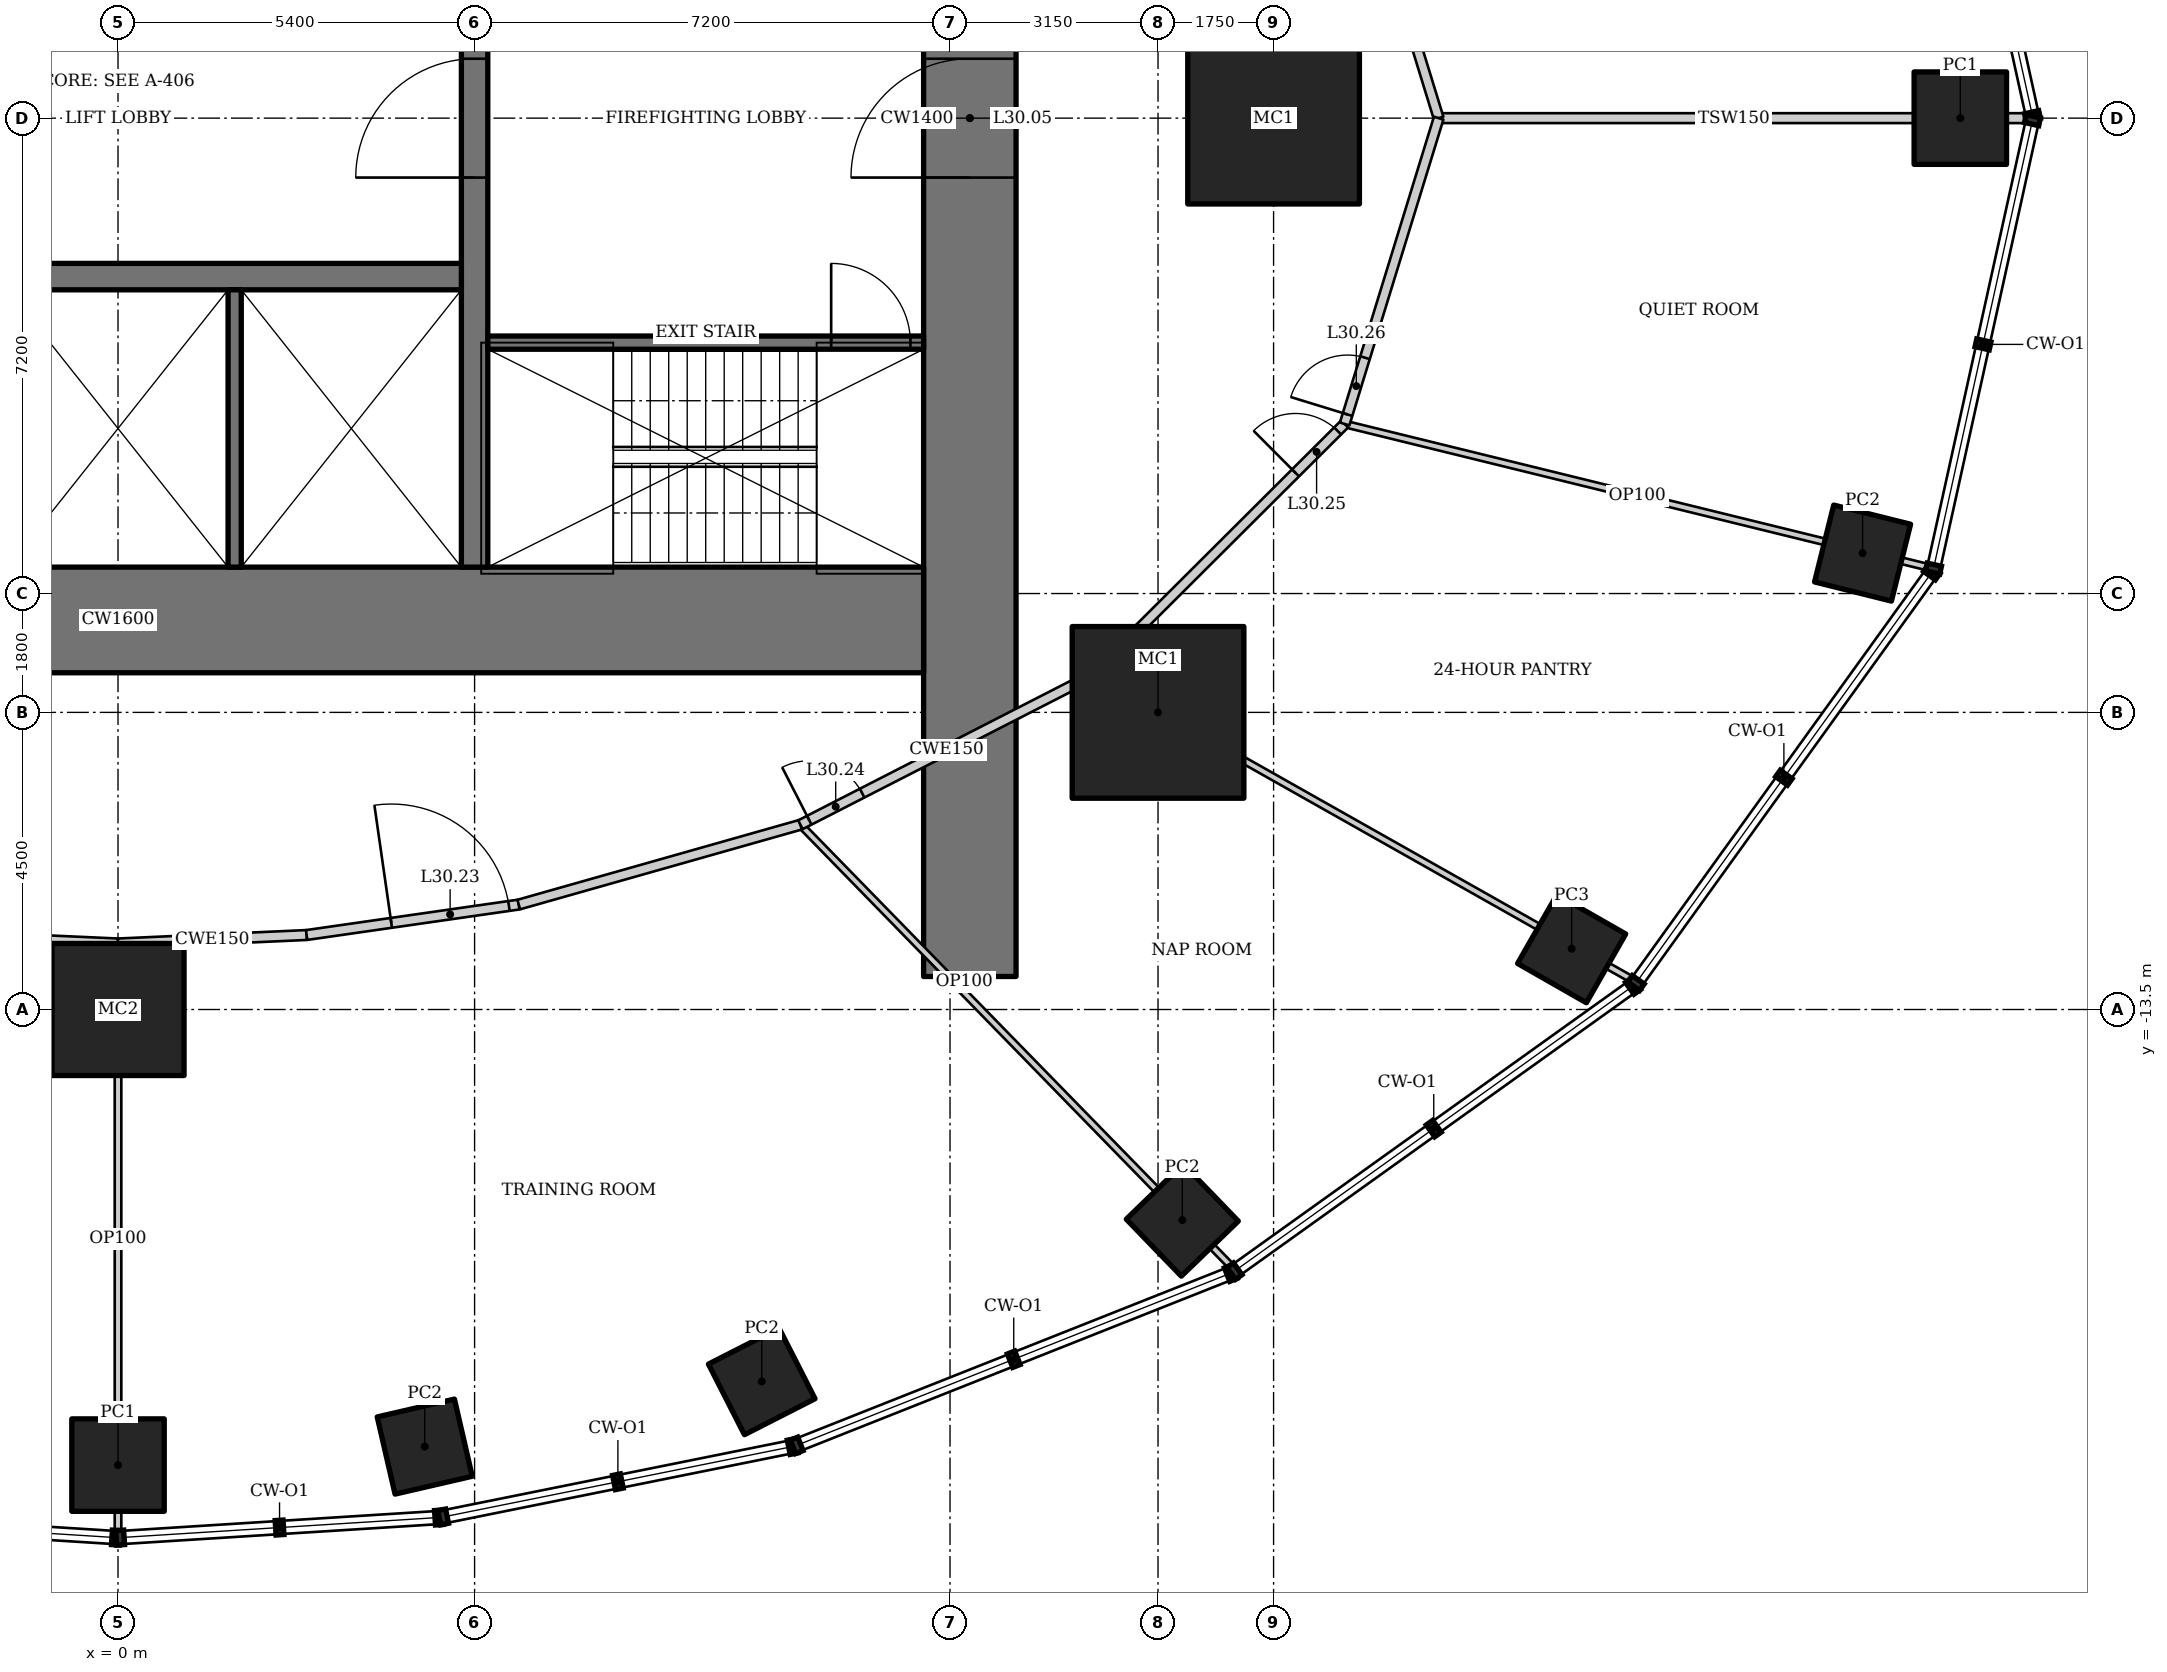
"""IFC4 building model, lengths in metres.
Left out: names, types, materials, properties, quantities, classifications, styles, units other than length and angle.
Written with IfcOpenShell. Run it as: python <this file> out.ifc"""

import sys

from ifc_helpers import new_model, si_unit, direction, frame, frame_2d, origin, origin_2d, place, context, subcontext, project, spatial, rectangle, hollow_rectangle, extrude, element, fill, save


model = new_model("IFC4")
c1 = context("Model", 3, precision=1e-05, world=origin(), true_north=direction((0.0, 1.0)))
c2 = subcontext(c1, "Body", "Model", "MODEL_VIEW")
j1 = project(units=[si_unit("LENGTHUNIT", "METRE"), si_unit("PLANEANGLEUNIT", "RADIAN")], contexts=[c1])
p1 = place(None, origin())
s1 = spatial("IfcSite", under=j1, at=p1, CompositionType="ELEMENT")
p2 = place(p1, origin())
s2 = spatial("IfcBuilding", under=s1, at=p2, CompositionType="ELEMENT")
p3 = place(p2, frame((0.0, 0.0, 130.0)))
s3 = spatial("IfcBuildingStorey", under=s2, at=p3, CompositionType="ELEMENT", Elevation=130.0)
p4 = place(p3, frame((17.5, 0.0, 0.0), z_axis=(0.0, 0.0, 1.0), x_axis=(1.0, 0.0, 0.0)))
e1 = element("IfcColumn", 1, at=p4, inside=s3, PredefinedType="COLUMN", context=c2, shape_type="SweptSolid", body=[
    extrude(hollow_rectangle(XDim=2.6, YDim=2.6, WallThickness=0.13, at=origin_2d()), origin(), (0.0, 0.0, 1.0), 4.2),
])
p5 = place(p3, frame((0.0, -13.5, 0.0), z_axis=(0.0, 0.0, 1.0), x_axis=(1.0, 0.0, 0.0)))
e2 = element("IfcColumn", 2, at=p5, inside=s3, PredefinedType="COLUMN", context=c2, shape_type="SweptSolid", body=[
    extrude(hollow_rectangle(XDim=2.0, YDim=2.0, WallThickness=0.17, at=origin_2d()), origin(), (0.0, 0.0, 1.0), 4.2),
])
p6 = place(p3, frame((15.75, -9.0, 0.0), z_axis=(0.0, 0.0, 1.0), x_axis=(1.0, 0.0, 0.0)))
e3 = element("IfcColumn", 3, at=p6, inside=s3, PredefinedType="COLUMN", context=c2, shape_type="SweptSolid", body=[
    extrude(hollow_rectangle(XDim=2.6, YDim=2.6, WallThickness=0.13, at=origin_2d()), origin(), (0.0, 0.0, 1.0), 4.2),
])
for number, where, z_axis, x_axis in (
    (4, (27.9, 0.0, 0.0), (0.0, 0.0, 1.0), (1.0, 0.0, 0.0)),
    (5, (0.0, -20.4, 0.0), (0.0, 0.0, 1.0), (1.0, 0.0, 0.0)),
):
    element("IfcColumn", number, at=place(p3, frame(where, z_axis=z_axis, x_axis=x_axis)), inside=s3, PredefinedType="COLUMN", context=c2, shape_type="SweptSolid", body=[
        extrude(hollow_rectangle(XDim=1.4, YDim=1.4, WallThickness=0.1, at=origin_2d()), origin(), (0.0, 0.0, 1.0), 4.2),
    ])
for number, where, z_axis, x_axis in (
    (6, (4.645, -20.12, 0.0), (0.0, 0.0, 1.0), (0.974, 0.225, 0.0)),
    (7, (9.749, -19.133, 0.0), (0.0, 0.0, 1.0), (0.891, 0.454, 0.0)),
    (8, (16.118, -16.69, 0.0), (0.0, 0.0, 1.0), (0.719, 0.695, 0.0)),
):
    element("IfcColumn", number, at=place(p3, frame(where, z_axis=z_axis, x_axis=x_axis)), inside=s3, PredefinedType="COLUMN", context=c2, shape_type="SweptSolid", body=[
        extrude(hollow_rectangle(XDim=1.2, YDim=1.2, WallThickness=0.1, at=origin_2d()), origin(), (0.0, 0.0, 1.0), 4.2),
    ])
p7 = place(p3, frame((22.014, -12.579, 0.0), z_axis=(0.0, 0.0, 1.0), x_axis=(0.496139221777, 0.86824298017, 0.0)))
e9 = element("IfcColumn", 9, at=p7, inside=s3, PredefinedType="COLUMN", context=c2, shape_type="SweptSolid", body=[
    extrude(hollow_rectangle(XDim=1.2, YDim=1.2, WallThickness=0.12, at=origin_2d()), origin(), (0.0, 0.0, 1.0), 4.2),
])
p8 = place(p3, frame((26.42, -6.587, 0.0), z_axis=(0.0, 0.0, 1.0), x_axis=(0.2419218956, 0.970295726276, 0.0)))
e10 = element("IfcColumn", 10, at=p8, inside=s3, PredefinedType="COLUMN", context=c2, shape_type="SweptSolid", body=[
    extrude(hollow_rectangle(XDim=1.2, YDim=1.2, WallThickness=0.1, at=origin_2d()), origin(), (0.0, 0.0, 1.0), 4.2),
])
p9 = place(p3, frame((12.9, -13.0, 0.0), z_axis=(0.0, 0.0, 1.0), x_axis=(0.0, 1.0, 0.0)))
e11 = element("IfcWall", 11, at=p9, inside=s3, PredefinedType="SHEAR", context=c2, shape_type="SweptSolid", body=[
    extrude(rectangle(XDim=26.0, YDim=1.4, at=frame_2d((13.0, 0.0))), origin(), (0.0, 0.0, 1.0), 4.2),
])
p10 = place(p9, frame((12.1, 0.0, 0.0)))
e12 = element("IfcOpeningElement", 12, at=p10, cuts=e11, PredefinedType="OPENING", context=c2, shape_type="SweptSolid", body=[
    extrude(rectangle(XDim=1.8, YDim=2.1, at=frame_2d((0.9, 1.05))), frame((0.0, 0.71, 0.0), z_axis=(0.0, -1.0, 0.0), x_axis=(1.0, 0.0, 0.0)), (0.0, 0.0, 1.0), 1.42),
])
p11 = place(p3, frame((-12.2, -7.6, 0.0), z_axis=(0.0, 0.0, 1.0), x_axis=(1.0, 0.0, 0.0)))
e13 = element("IfcWall", 13, at=p11, inside=s3, PredefinedType="SHEAR", context=c2, shape_type="SweptSolid", body=[
    extrude(rectangle(XDim=24.4, YDim=1.6, at=frame_2d((12.2, 0.0))), origin(), (0.0, 0.0, 1.0), 4.2),
])
p12 = place(p3, frame((5.4, -6.8, 0.0), z_axis=(0.0, 0.0, 1.0), x_axis=(0.0, 1.0, 0.0)))
e14 = element("IfcWall", 14, at=p12, inside=s3, PredefinedType="SHEAR", context=c2, shape_type="SweptSolid", body=[
    extrude(rectangle(XDim=13.6, YDim=0.4, at=frame_2d((6.8, 0.0))), origin(), (0.0, 0.0, 1.0), 4.2),
])
p13 = place(p12, frame((5.9, 0.0, 0.0)))
e15 = element("IfcOpeningElement", 15, at=p13, cuts=e14, PredefinedType="OPENING", context=c2, shape_type="SweptSolid", body=[
    extrude(rectangle(XDim=1.8, YDim=2.1, at=frame_2d((0.9, 1.05))), frame((0.0, 0.21, 0.0), z_axis=(0.0, -1.0, 0.0), x_axis=(1.0, 0.0, 0.0)), (0.0, 0.0, 1.0), 0.42),
])
p14 = place(p3, frame((-5.2, -2.4, 0.0), z_axis=(0.0, 0.0, 1.0), x_axis=(1.0, 0.0, 0.0)))
e16 = element("IfcWall", 16, at=p14, inside=s3, PredefinedType="SHEAR", context=c2, shape_type="SweptSolid", body=[
    extrude(rectangle(XDim=10.4, YDim=0.4, at=frame_2d((5.2, 0.0))), origin(), (0.0, 0.0, 1.0), 4.2),
])
p15 = place(p3, frame((1.767, -2.6, 0.0), z_axis=(0.0, 0.0, 1.0), x_axis=(0.0, -1.0, 0.0)))
e17 = element("IfcWall", 17, at=p15, inside=s3, PredefinedType="SOLIDWALL", context=c2, shape_type="SweptSolid", body=[
    extrude(rectangle(XDim=4.2, YDim=0.2, at=frame_2d((2.1, 0.0))), origin(), (0.0, 0.0, 1.0), 4.2),
])
p16 = place(p3, frame((5.6, -3.4, 0.0), z_axis=(0.0, 0.0, 1.0), x_axis=(1.0, 0.0, 0.0)))
e18 = element("IfcWall", 18, at=p16, inside=s3, PredefinedType="SHEAR", context=c2, shape_type="SweptSolid", body=[
    extrude(rectangle(XDim=6.6, YDim=0.2, at=frame_2d((3.3, 0.0))), origin(), (0.0, 0.0, 1.0), 4.2),
])
p17 = place(p16, frame((5.2, 0.0, 0.0)))
e19 = element("IfcOpeningElement", 19, at=p17, cuts=e18, PredefinedType="OPENING", context=c2, shape_type="SweptSolid", body=[
    extrude(rectangle(XDim=1.2, YDim=2.1, at=frame_2d((0.6, 1.05))), frame((0.0, 0.11, 0.0), z_axis=(0.0, -1.0, 0.0), x_axis=(1.0, 0.0, 0.0)), (0.0, 0.0, 1.0), 0.22),
])
p18 = place(p3, frame((28.944, 0.0, 0.0), z_axis=(0.0, 0.0, 1.0), x_axis=(-1.0, 0.0, 0.0)))
e20 = element("IfcWall", 20, at=p18, inside=s3, PredefinedType="PARTITIONING", context=c2, shape_type="SweptSolid", body=[
    extrude(rectangle(XDim=8.944, YDim=0.15, at=frame_2d((4.472, 0.0))), origin(), (0.0, 0.0, 1.0), 3.204),
])
p19 = place(p3, frame((0.0, -21.445, 0.0), z_axis=(0.0, 0.0, 1.0), x_axis=(0.0, 1.0, 0.0)))
e21 = element("IfcWall", 21, at=p19, inside=s3, PredefinedType="PARTITIONING", context=c2, shape_type="SweptSolid", body=[
    extrude(rectangle(XDim=8.945, YDim=0.1, at=frame_2d((4.472, 0.0))), origin(), (0.0, 0.0, 1.0), 3.644),
])
p20 = place(p3, frame((16.882, -17.414, 0.0), z_axis=(0.0, 0.0, 1.0), x_axis=(-0.698290989425, 0.715814008027, 0.0)))
e22 = element("IfcWall", 22, at=p20, inside=s3, PredefinedType="PARTITIONING", context=c2, shape_type="SweptSolid", body=[
    extrude(rectangle(XDim=9.377, YDim=0.1, at=frame_2d((4.688, 0.0))), origin(), (0.0, 0.0, 1.0), 3.321),
])
p21 = place(p3, frame((22.949, -13.059, 0.0), z_axis=(0.0, 0.0, 1.0), x_axis=(-0.870733950517, 0.491754397456, 0.0)))
e23 = element("IfcWall", 23, at=p21, inside=s3, PredefinedType="PARTITIONING", context=c2, shape_type="SweptSolid", body=[
    extrude(rectangle(XDim=9.404, YDim=0.1, at=frame_2d((4.702, 0.0))), origin(), (0.0, 0.0, 1.0), 3.45),
])
p22 = place(p3, frame((27.441, -6.809, 0.0), z_axis=(0.0, 0.0, 1.0), x_axis=(-0.971128704348, 0.238556156056, 0.0)))
e24 = element("IfcWall", 24, at=p22, inside=s3, PredefinedType="PARTITIONING", context=c2, shape_type="SweptSolid", body=[
    extrude(rectangle(XDim=9.128, YDim=0.1, at=frame_2d((4.564, 0.0))), origin(), (0.0, 0.0, 1.0), 3.113),
])
p23 = place(p3, frame((20.0, 0.0, 0.0), z_axis=(0.0, 0.0, 1.0), x_axis=(-0.293799045613, 0.955867208767, 0.0)))
e25 = element("IfcWall", 25, at=p23, inside=s3, PredefinedType="PARTITIONING", context=c2, shape_type="SweptSolid", body=[
    extrude(rectangle(XDim=4.845, YDim=0.15, at=frame_2d((2.423, 0.0))), origin(), (0.0, 0.0, 1.0), 4.05),
])
for number, where, z_axis, x_axis in (
    (26, (-2.856, -12.372, 0.0), (0.0, 0.0, 1.0), (0.999, -0.045, 0.0)),
    (27, (0.0, -12.5, 0.0), (0.0, 0.0, 1.0), (0.999, 0.045, 0.0)),
):
    element("IfcWall", number, at=place(p3, frame(where, z_axis=z_axis, x_axis=x_axis)), inside=s3, PredefinedType="PARTITIONING", context=c2, shape_type="SweptSolid", body=[
        extrude(rectangle(XDim=2.859, YDim=0.15, at=frame_2d((1.43, 0.0))), origin(), (0.0, 0.0, 1.0), 4.05),
    ])
p24 = place(p3, frame((2.856, -12.372, 0.0), z_axis=(0.0, 0.0, 1.0), x_axis=(0.989852979412, 0.14209531713, 0.0)))
e28 = element("IfcWall", 28, at=p24, inside=s3, PredefinedType="PARTITIONING", context=c2, shape_type="SweptSolid", body=[
    extrude(rectangle(XDim=3.246, YDim=0.15, at=frame_2d((1.623, 0.0))), origin(), (0.0, 0.0, 1.0), 4.05),
])
p25 = place(p24, frame((1.295, 0.0, 0.0)))
e29 = element("IfcOpeningElement", 29, at=p25, cuts=e28, PredefinedType="OPENING", context=c2, shape_type="SweptSolid", body=[
    extrude(rectangle(XDim=1.8, YDim=2.1, at=frame_2d((0.9, 1.05))), frame((0.0, 0.085, 0.0), z_axis=(0.0, -1.0, 0.0), x_axis=(1.0, 0.0, 0.0)), (0.0, 0.0, 1.0), 0.17),
])
p26 = place(p3, frame((6.069, -11.911, 0.0), z_axis=(0.0, 0.0, 1.0), x_axis=(0.962122152905, 0.272618713388, 0.0)))
e30 = element("IfcWall", 30, at=p26, inside=s3, PredefinedType="PARTITIONING", context=c2, shape_type="SweptSolid", body=[
    extrude(rectangle(XDim=4.434, YDim=0.15, at=frame_2d((2.217, 0.0))), origin(), (0.0, 0.0, 1.0), 4.05),
])
p27 = place(p3, frame((10.335, -10.702, 0.0), z_axis=(0.0, 0.0, 1.0), x_axis=(0.890004978294, 0.455950807227, 0.0)))
e31 = element("IfcWall", 31, at=p27, inside=s3, PredefinedType="PARTITIONING", context=c2, shape_type="SweptSolid", body=[
    extrude(rectangle(XDim=4.973, YDim=0.15, at=frame_2d((2.486, 0.0))), origin(), (0.0, 0.0, 1.0), 4.05),
])
p28 = place(p27, frame((0.15, 0.0, 0.0)))
e32 = element("IfcOpeningElement", 32, at=p28, cuts=e31, PredefinedType="OPENING", context=c2, shape_type="SweptSolid", body=[
    extrude(rectangle(XDim=0.9, YDim=2.1, at=frame_2d((0.45, 1.05))), frame((0.0, 0.085, 0.0), z_axis=(0.0, -1.0, 0.0), x_axis=(1.0, 0.0, 0.0)), (0.0, 0.0, 1.0), 0.17),
])
p29 = place(p3, frame((14.76, -8.435, 0.0), z_axis=(0.0, 0.0, 1.0), x_axis=(0.708306665233, 0.705904857603, 0.0)))
e33 = element("IfcWall", 33, at=p29, inside=s3, PredefinedType="PARTITIONING", context=c2, shape_type="SweptSolid", body=[
    extrude(rectangle(XDim=5.387, YDim=0.15, at=frame_2d((2.694, 0.0))), origin(), (0.0, 0.0, 1.0), 4.05),
])
p30 = place(p29, frame((4.337, 0.0, 0.0)))
e34 = element("IfcOpeningElement", 34, at=p30, cuts=e33, PredefinedType="OPENING", context=c2, shape_type="SweptSolid", body=[
    extrude(rectangle(XDim=0.9, YDim=2.1, at=frame_2d((0.45, 1.05))), frame((0.0, 0.085, 0.0), z_axis=(0.0, -1.0, 0.0), x_axis=(1.0, 0.0, 0.0)), (0.0, 0.0, 1.0), 0.17),
])
p31 = place(p3, frame((18.576, -4.632, 0.0), z_axis=(0.0, 0.0, 1.0), x_axis=(0.293799045613, 0.955867208767, 0.0)))
e35 = element("IfcWall", 35, at=p31, inside=s3, PredefinedType="PARTITIONING", context=c2, shape_type="SweptSolid", body=[
    extrude(rectangle(XDim=4.845, YDim=0.15, at=frame_2d((2.423, 0.0))), origin(), (0.0, 0.0, 1.0), 4.05),
])
p32 = place(p31, frame((0.15, 0.0, 0.0)))
e36 = element("IfcOpeningElement", 36, at=p32, cuts=e35, PredefinedType="OPENING", context=c2, shape_type="SweptSolid", body=[
    extrude(rectangle(XDim=0.9, YDim=2.1, at=frame_2d((0.45, 1.05))), frame((0.0, 0.085, 0.0), z_axis=(0.0, -1.0, 0.0), x_axis=(1.0, 0.0, 0.0)), (0.0, 0.0, 1.0), 0.17),
])
p33 = place(p3, frame((12.9, -13.0, 0.0), z_axis=(0.0, 0.0, 1.0), x_axis=(-0.716013316663, -0.698086620959, 0.0)))
e37 = element("IfcWall", 37, at=p33, inside=s3, PredefinedType="PARTITIONING", context=c2, shape_type="SweptSolid", body=[
    extrude(rectangle(XDim=0.231, YDim=0.1, at=frame_2d((0.116, 0.0))), origin(), (0.0, 0.0, 1.0), 4.05),
])
p34 = place(p13, origin())
e38 = element("IfcDoor", 38, at=p34, inside=s3, OperationType="DOUBLE_DOOR_DOUBLE_SWING", PredefinedType="DOOR", context=c2, shape_type="SweptSolid", body=[
    extrude(rectangle(XDim=1.8, YDim=2.1, at=frame_2d((0.9, 1.05))), frame((0.0, 0.025, 0.0), z_axis=(0.0, -1.0, 0.0), x_axis=(1.0, 0.0, 0.0)), (0.0, 0.0, 1.0), 0.05),
])
fill(e15, e38)
p35 = place(p17, origin())
e39 = element("IfcDoor", 39, at=p35, inside=s3, OperationType="SINGLE_SWING_RIGHT", PredefinedType="DOOR", context=c2, shape_type="SweptSolid", body=[
    extrude(rectangle(XDim=1.2, YDim=2.1, at=frame_2d((0.6, 1.05))), frame((0.0, 0.025, 0.0), z_axis=(0.0, -1.0, 0.0), x_axis=(1.0, 0.0, 0.0)), (0.0, 0.0, 1.0), 0.05),
])
fill(e19, e39)
p36 = place(p10, origin())
e40 = element("IfcDoor", 40, at=p36, inside=s3, OperationType="DOUBLE_DOOR_DOUBLE_SWING", PredefinedType="DOOR", context=c2, shape_type="SweptSolid", body=[
    extrude(rectangle(XDim=1.8, YDim=2.1, at=frame_2d((0.9, 1.05))), frame((0.0, 0.025, 0.0), z_axis=(0.0, -1.0, 0.0), x_axis=(1.0, 0.0, 0.0)), (0.0, 0.0, 1.0), 0.05),
])
fill(e12, e40)
p37 = place(p25, origin())
e41 = element("IfcDoor", 41, at=p37, inside=s3, OperationType="DOUBLE_DOOR_DOUBLE_SWING", PredefinedType="DOOR", context=c2, shape_type="SweptSolid", body=[
    extrude(rectangle(XDim=1.8, YDim=2.1, at=frame_2d((0.9, 1.05))), frame((0.0, 0.025, 0.0), z_axis=(0.0, -1.0, 0.0), x_axis=(1.0, 0.0, 0.0)), (0.0, 0.0, 1.0), 0.05),
])
fill(e29, e41)
p38 = place(p28, origin())
e42 = element("IfcDoor", 42, at=p38, inside=s3, OperationType="SINGLE_SWING_LEFT", PredefinedType="DOOR", context=c2, shape_type="SweptSolid", body=[
    extrude(rectangle(XDim=0.9, YDim=2.1, at=frame_2d((0.45, 1.05))), frame((0.0, 0.025, 0.0), z_axis=(0.0, -1.0, 0.0), x_axis=(1.0, 0.0, 0.0)), (0.0, 0.0, 1.0), 0.05),
])
fill(e32, e42)
p39 = place(p30, origin())
e43 = element("IfcDoor", 43, at=p39, inside=s3, OperationType="SINGLE_SWING_LEFT", PredefinedType="DOOR", context=c2, shape_type="SweptSolid", body=[
    extrude(rectangle(XDim=0.9, YDim=2.1, at=frame_2d((0.45, 1.05))), frame((0.0, 0.025, 0.0), z_axis=(0.0, -1.0, 0.0), x_axis=(1.0, 0.0, 0.0)), (0.0, 0.0, 1.0), 0.05),
])
fill(e34, e43)
p40 = place(p32, origin())
e44 = element("IfcDoor", 44, at=p40, inside=s3, OperationType="SINGLE_SWING_LEFT", PredefinedType="DOOR", context=c2, shape_type="SweptSolid", body=[
    extrude(rectangle(XDim=0.9, YDim=2.1, at=frame_2d((0.45, 1.05))), frame((0.0, 0.025, 0.0), z_axis=(0.0, -1.0, 0.0), x_axis=(1.0, 0.0, 0.0)), (0.0, 0.0, 1.0), 0.05),
])
fill(e36, e44)
save(model, sys.argv[1])
